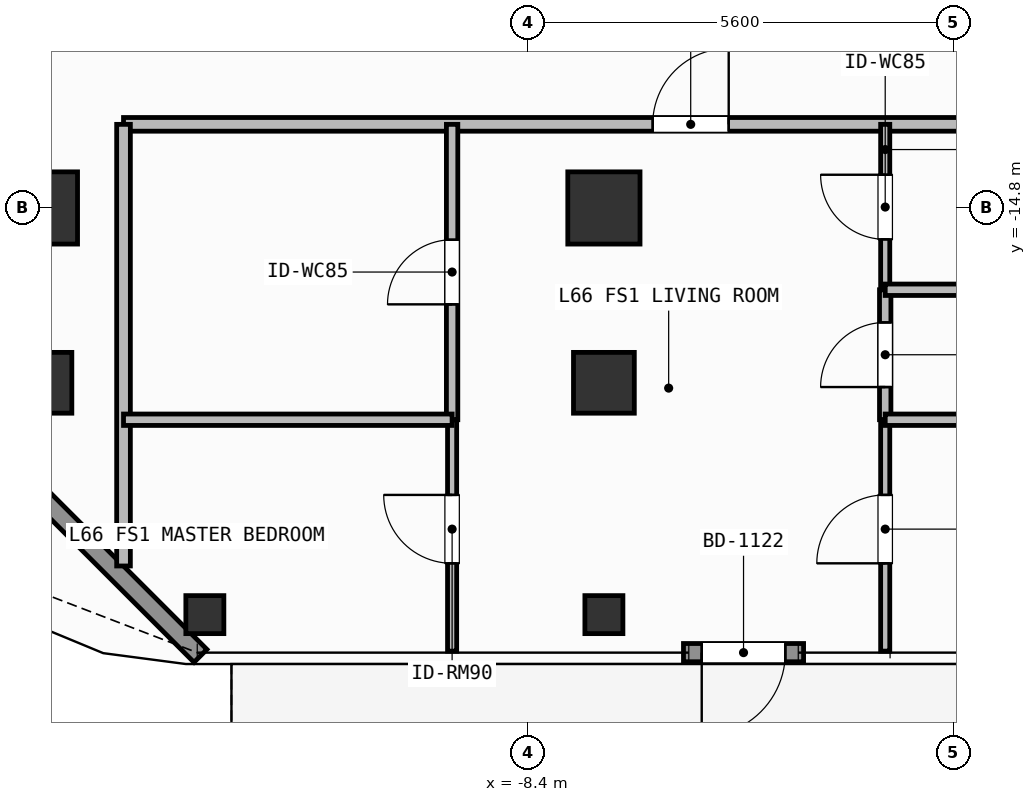
"""IFC4 building model, lengths in metres.
Left out: names, types, materials, properties, quantities, classifications, styles, units other than length and angle.
Written with IfcOpenShell. Run it as: python <this file> out.ifc"""

import sys

from ifc_helpers import new_model, si_unit, direction, frame, frame_2d, origin, origin_2d, place, context, subcontext, project, spatial, rectangle, hollow_rectangle, extrude, element, fill, save


model = new_model("IFC4")
c1 = context("Model", 3, precision=1e-05, world=origin(), true_north=direction((0.0, 1.0)))
c2 = subcontext(c1, "Body", "Model", "MODEL_VIEW")
j1 = project(units=[si_unit("LENGTHUNIT", "METRE"), si_unit("PLANEANGLEUNIT", "RADIAN")], contexts=[c1])
p1 = place(None, origin())
s1 = spatial("IfcSite", under=j1, at=p1, CompositionType="ELEMENT")
p2 = place(p1, origin())
s2 = spatial("IfcBuilding", under=s1, at=p2, CompositionType="ELEMENT")
p3 = place(p2, frame((0.0, 0.0, 270.3)))
s3 = spatial("IfcBuildingStorey", under=s2, at=p3, CompositionType="ELEMENT", Elevation=270.3)
for number, where, z_axis, x_axis in (
    (1, (-14.8, -14.8, 0.0), (0.0, 0.0, 1.0), (1.0, 0.0, 0.0)),
    (2, (-7.4, -14.8, 0.0), (0.0, 0.0, 1.0), (1.0, 0.0, 0.0)),
):
    element("IfcColumn", number, at=place(p3, frame(where, z_axis=z_axis, x_axis=x_axis)), inside=s3, PredefinedType="COLUMN", context=c2, shape_type="SweptSolid", body=[
        extrude(rectangle(XDim=0.95, YDim=0.95, at=origin_2d()), origin(), (0.0, 0.0, 1.0), 3.9),
    ])
for number, where, z_axis, x_axis in (
    (3, (-14.8, -17.1, 0.0), (0.0, 0.0, 1.0), (1.0, 0.0, 0.0)),
    (4, (-7.4, -17.1, 0.0), (0.0, 0.0, 1.0), (1.0, 0.0, 0.0)),
):
    element("IfcColumn", number, at=place(p3, frame(where, z_axis=z_axis, x_axis=x_axis)), inside=s3, PredefinedType="COLUMN", context=c2, shape_type="SweptSolid", body=[
        extrude(hollow_rectangle(XDim=0.8, YDim=0.8, WallThickness=0.036, at=origin_2d()), origin(), (0.0, 0.0, 1.0), 3.9),
    ])
for number, where, z_axis, x_axis in (
    (5, (-12.65, -20.15, 0.0), (0.0, 0.0, 1.0), (1.0, 0.0, 0.0)),
    (6, (-7.4, -20.15, 0.0), (0.0, 0.0, 1.0), (1.0, 0.0, 0.0)),
):
    element("IfcColumn", number, at=place(p3, frame(where, z_axis=z_axis, x_axis=x_axis)), inside=s3, PredefinedType="COLUMN", context=c2, shape_type="SweptSolid", body=[
        extrude(hollow_rectangle(XDim=0.5, YDim=0.5, WallThickness=0.025, at=origin_2d()), origin(), (0.0, 0.0, 1.0), 3.9),
    ])
p4 = place(p3, frame((-4.773, -20.65, 0.0), z_axis=(0.0, 0.0, 1.0), x_axis=(-1.0, 0.0, 0.0)))
e7 = element("IfcWall", 7, at=p4, inside=s3, PredefinedType="SOLIDWALL", context=c2, shape_type="SweptSolid", body=[
    extrude(rectangle(XDim=1.58, YDim=0.24, at=frame_2d((0.79, 0.0))), origin(), (0.0, 0.0, 1.0), 3.68),
])
p5 = place(p4, frame((0.24, 0.0, 0.0)))
e8 = element("IfcOpeningElement", 8, at=p5, cuts=e7, PredefinedType="OPENING", context=c2, shape_type="SweptSolid", body=[
    extrude(rectangle(XDim=1.1, YDim=2.2, at=frame_2d((0.55, 1.1))), frame((0.0, 0.13, 0.0), z_axis=(0.0, -1.0, 0.0), x_axis=(1.0, 0.0, 0.0)), (0.0, 0.0, 1.0), 0.26),
])
p6 = place(p3, frame((-12.708, -20.692, 0.0), z_axis=(0.0, 0.0, 1.0), x_axis=(-0.707126925818, 0.707086635981, 0.0)))
e9 = element("IfcWall", 9, at=p6, inside=s3, PredefinedType="SOLIDWALL", context=c2, shape_type="SweptSolid", body=[
    extrude(rectangle(XDim=6.06, YDim=0.24, at=frame_2d((3.03, 0.0))), origin(), (0.0, 0.0, 1.0), 3.68),
])
p7 = place(p3, frame((-13.72, -13.7, 0.0), z_axis=(0.0, 0.0, 1.0), x_axis=(1.0, 0.0, 0.0)))
e10 = element("IfcWall", 10, at=p7, inside=s3, PredefinedType="PARTITIONING", context=c2, shape_type="SweptSolid", body=[
    extrude(rectangle(XDim=14.566, YDim=0.18, at=frame_2d((7.283, 0.0))), origin(), (0.0, 0.0, 1.0), 3.68),
])
p8 = place(p7, frame((6.962, 0.0, 0.0)))
e11 = element("IfcOpeningElement", 11, at=p8, cuts=e10, PredefinedType="OPENING", context=c2, shape_type="SweptSolid", body=[
    extrude(rectangle(XDim=1.0, YDim=2.2, at=frame_2d((0.5, 1.1))), frame((0.0, 0.1, 0.0), z_axis=(0.0, -1.0, 0.0), x_axis=(1.0, 0.0, 0.0)), (0.0, 0.0, 1.0), 0.2),
])
p9 = place(p3, frame((-9.397, -17.586, 0.0), z_axis=(0.0, 0.0, 1.0), x_axis=(0.0, 1.0, 0.0)))
e12 = element("IfcWall", 12, at=p9, inside=s3, PredefinedType="PARTITIONING", context=c2, shape_type="SweptSolid", body=[
    extrude(rectangle(XDim=3.886, YDim=0.15, at=frame_2d((1.943, 0.0))), origin(), (0.0, 0.0, 1.0), 3.68),
])
p10 = place(p9, frame((1.518, 0.0, 0.0)))
e13 = element("IfcOpeningElement", 13, at=p10, cuts=e12, PredefinedType="OPENING", context=c2, shape_type="SweptSolid", body=[
    extrude(rectangle(XDim=0.85, YDim=2.1, at=frame_2d((0.425, 1.05))), frame((0.0, 0.085, 0.0), z_axis=(0.0, -1.0, 0.0), x_axis=(1.0, 0.0, 0.0)), (0.0, 0.0, 1.0), 0.17),
])
p11 = place(p3, frame((-9.397, -20.63, 0.0), z_axis=(0.0, 0.0, 1.0), x_axis=(0.0, 1.0, 0.0)))
e14 = element("IfcWall", 14, at=p11, inside=s3, PredefinedType="PARTITIONING", context=c2, shape_type="SweptSolid", body=[
    extrude(rectangle(XDim=3.044, YDim=0.12, at=frame_2d((1.522, 0.0))), origin(), (0.0, 0.0, 1.0), 3.68),
])
p12 = place(p11, frame((1.155, 0.0, 0.0)))
e15 = element("IfcOpeningElement", 15, at=p12, cuts=e14, PredefinedType="OPENING", context=c2, shape_type="SweptSolid", body=[
    extrude(rectangle(XDim=0.9, YDim=2.1, at=frame_2d((0.45, 1.05))), frame((0.0, 0.07, 0.0), z_axis=(0.0, -1.0, 0.0), x_axis=(1.0, 0.0, 0.0)), (0.0, 0.0, 1.0), 0.14),
])
p13 = place(p3, frame((-3.699, -17.586, 0.0), z_axis=(0.0, 0.0, 1.0), x_axis=(0.0, 1.0, 0.0)))
e16 = element("IfcWall", 16, at=p13, inside=s3, PredefinedType="PARTITIONING", context=c2, shape_type="SweptSolid", body=[
    extrude(rectangle(XDim=1.71, YDim=0.15, at=frame_2d((0.855, 0.0))), origin(), (0.0, 0.0, 1.0), 3.68),
])
p14 = place(p13, frame((0.43, 0.0, 0.0)))
e17 = element("IfcOpeningElement", 17, at=p14, cuts=e16, PredefinedType="OPENING", context=c2, shape_type="SweptSolid", body=[
    extrude(rectangle(XDim=0.85, YDim=2.1, at=frame_2d((0.425, 1.05))), frame((0.0, 0.085, 0.0), z_axis=(0.0, -1.0, 0.0), x_axis=(1.0, 0.0, 0.0)), (0.0, 0.0, 1.0), 0.17),
])
p15 = place(p3, frame((-3.699, -15.876, 0.0), z_axis=(0.0, 0.0, 1.0), x_axis=(0.0, 1.0, 0.0)))
e18 = element("IfcWall", 18, at=p15, inside=s3, PredefinedType="PARTITIONING", context=c2, shape_type="SweptSolid", body=[
    extrude(rectangle(XDim=2.176, YDim=0.12, at=frame_2d((1.088, 0.0))), origin(), (0.0, 0.0, 1.0), 3.68),
])
p16 = place(p15, frame((0.663, 0.0, 0.0)))
e19 = element("IfcOpeningElement", 19, at=p16, cuts=e18, PredefinedType="OPENING", context=c2, shape_type="SweptSolid", body=[
    extrude(rectangle(XDim=0.85, YDim=2.1, at=frame_2d((0.425, 1.05))), frame((0.0, 0.07, 0.0), z_axis=(0.0, -1.0, 0.0), x_axis=(1.0, 0.0, 0.0)), (0.0, 0.0, 1.0), 0.14),
])
p17 = place(p3, frame((-3.699, -20.63, 0.0), z_axis=(0.0, 0.0, 1.0), x_axis=(0.0, 1.0, 0.0)))
e20 = element("IfcWall", 20, at=p17, inside=s3, PredefinedType="PARTITIONING", context=c2, shape_type="SweptSolid", body=[
    extrude(rectangle(XDim=3.044, YDim=0.12, at=frame_2d((1.522, 0.0))), origin(), (0.0, 0.0, 1.0), 3.68),
])
p18 = place(p17, frame((1.155, 0.0, 0.0)))
e21 = element("IfcOpeningElement", 21, at=p18, cuts=e20, PredefinedType="OPENING", context=c2, shape_type="SweptSolid", body=[
    extrude(rectangle(XDim=0.9, YDim=2.1, at=frame_2d((0.45, 1.05))), frame((0.0, 0.07, 0.0), z_axis=(0.0, -1.0, 0.0), x_axis=(1.0, 0.0, 0.0)), (0.0, 0.0, 1.0), 0.14),
])
p19 = place(p3, frame((-13.72, -19.51, 0.0), z_axis=(0.0, 0.0, 1.0), x_axis=(0.0, 1.0, 0.0)))
e22 = element("IfcWall", 22, at=p19, inside=s3, PredefinedType="PARTITIONING", context=c2, shape_type="SweptSolid", body=[
    extrude(rectangle(XDim=5.81, YDim=0.18, at=frame_2d((2.905, 0.0))), origin(), (0.0, 0.0, 1.0), 3.68),
])
p20 = place(p3, frame((-13.72, -17.586, 0.0), z_axis=(0.0, 0.0, 1.0), x_axis=(1.0, 0.0, 0.0)))
e23 = element("IfcWall", 23, at=p20, inside=s3, PredefinedType="PARTITIONING", context=c2, shape_type="SweptSolid", body=[
    extrude(rectangle(XDim=4.323, YDim=0.15, at=frame_2d((2.162, 0.0))), origin(), (0.0, 0.0, 1.0), 3.68),
])
for number, where, z_axis, x_axis in (
    (24, (-3.699, -15.876, 0.0), (0.0, 0.0, 1.0), (1.0, 0.0, 0.0)),
    (25, (-3.699, -17.586, 0.0), (0.0, 0.0, 1.0), (1.0, 0.0, 0.0)),
):
    element("IfcWall", number, at=place(p3, frame(where, z_axis=z_axis, x_axis=x_axis)), inside=s3, PredefinedType="PARTITIONING", context=c2, shape_type="SweptSolid", body=[
        extrude(rectangle(XDim=4.545, YDim=0.15, at=frame_2d((2.272, 0.0))), origin(), (0.0, 0.0, 1.0), 3.68),
    ])
p21 = place(p5, origin())
e26 = element("IfcDoor", 26, at=p21, inside=s3, OperationType="SINGLE_SWING_RIGHT", PredefinedType="DOOR", context=c2, shape_type="SweptSolid", body=[
    extrude(rectangle(XDim=1.1, YDim=2.2, at=frame_2d((0.55, 1.1))), frame((0.0, 0.025, 0.0), z_axis=(0.0, -1.0, 0.0), x_axis=(1.0, 0.0, 0.0)), (0.0, 0.0, 1.0), 0.05),
])
fill(e8, e26)
p22 = place(p8, origin())
e27 = element("IfcDoor", 27, at=p22, inside=s3, OperationType="SINGLE_SWING_RIGHT", PredefinedType="DOOR", context=c2, shape_type="SweptSolid", body=[
    extrude(rectangle(XDim=1.0, YDim=2.2, at=frame_2d((0.5, 1.1))), frame((0.0, 0.025, 0.0), z_axis=(0.0, -1.0, 0.0), x_axis=(1.0, 0.0, 0.0)), (0.0, 0.0, 1.0), 0.05),
])
fill(e11, e27)
p23 = place(p10, origin())
e28 = element("IfcDoor", 28, at=p23, inside=s3, OperationType="SINGLE_SWING_LEFT", PredefinedType="DOOR", context=c2, shape_type="SweptSolid", body=[
    extrude(rectangle(XDim=0.85, YDim=2.1, at=frame_2d((0.425, 1.05))), frame((0.0, 0.025, 0.0), z_axis=(0.0, -1.0, 0.0), x_axis=(1.0, 0.0, 0.0)), (0.0, 0.0, 1.0), 0.05),
])
fill(e13, e28)
p24 = place(p12, origin())
e29 = element("IfcDoor", 29, at=p24, inside=s3, OperationType="SINGLE_SWING_RIGHT", PredefinedType="DOOR", context=c2, shape_type="SweptSolid", body=[
    extrude(rectangle(XDim=0.9, YDim=2.1, at=frame_2d((0.45, 1.05))), frame((0.0, 0.025, 0.0), z_axis=(0.0, -1.0, 0.0), x_axis=(1.0, 0.0, 0.0)), (0.0, 0.0, 1.0), 0.05),
])
fill(e15, e29)
p25 = place(p14, origin())
e30 = element("IfcDoor", 30, at=p25, inside=s3, OperationType="SINGLE_SWING_LEFT", PredefinedType="DOOR", context=c2, shape_type="SweptSolid", body=[
    extrude(rectangle(XDim=0.85, YDim=2.1, at=frame_2d((0.425, 1.05))), frame((0.0, 0.025, 0.0), z_axis=(0.0, -1.0, 0.0), x_axis=(1.0, 0.0, 0.0)), (0.0, 0.0, 1.0), 0.05),
])
fill(e17, e30)
p26 = place(p16, origin())
e31 = element("IfcDoor", 31, at=p26, inside=s3, OperationType="SINGLE_SWING_RIGHT", PredefinedType="DOOR", context=c2, shape_type="SweptSolid", body=[
    extrude(rectangle(XDim=0.85, YDim=2.1, at=frame_2d((0.425, 1.05))), frame((0.0, 0.025, 0.0), z_axis=(0.0, -1.0, 0.0), x_axis=(1.0, 0.0, 0.0)), (0.0, 0.0, 1.0), 0.05),
])
fill(e19, e31)
p27 = place(p18, origin())
e32 = element("IfcDoor", 32, at=p27, inside=s3, OperationType="SINGLE_SWING_LEFT", PredefinedType="DOOR", context=c2, shape_type="SweptSolid", body=[
    extrude(rectangle(XDim=0.9, YDim=2.1, at=frame_2d((0.45, 1.05))), frame((0.0, 0.025, 0.0), z_axis=(0.0, -1.0, 0.0), x_axis=(1.0, 0.0, 0.0)), (0.0, 0.0, 1.0), 0.05),
])
fill(e21, e32)
save(model, sys.argv[1])
